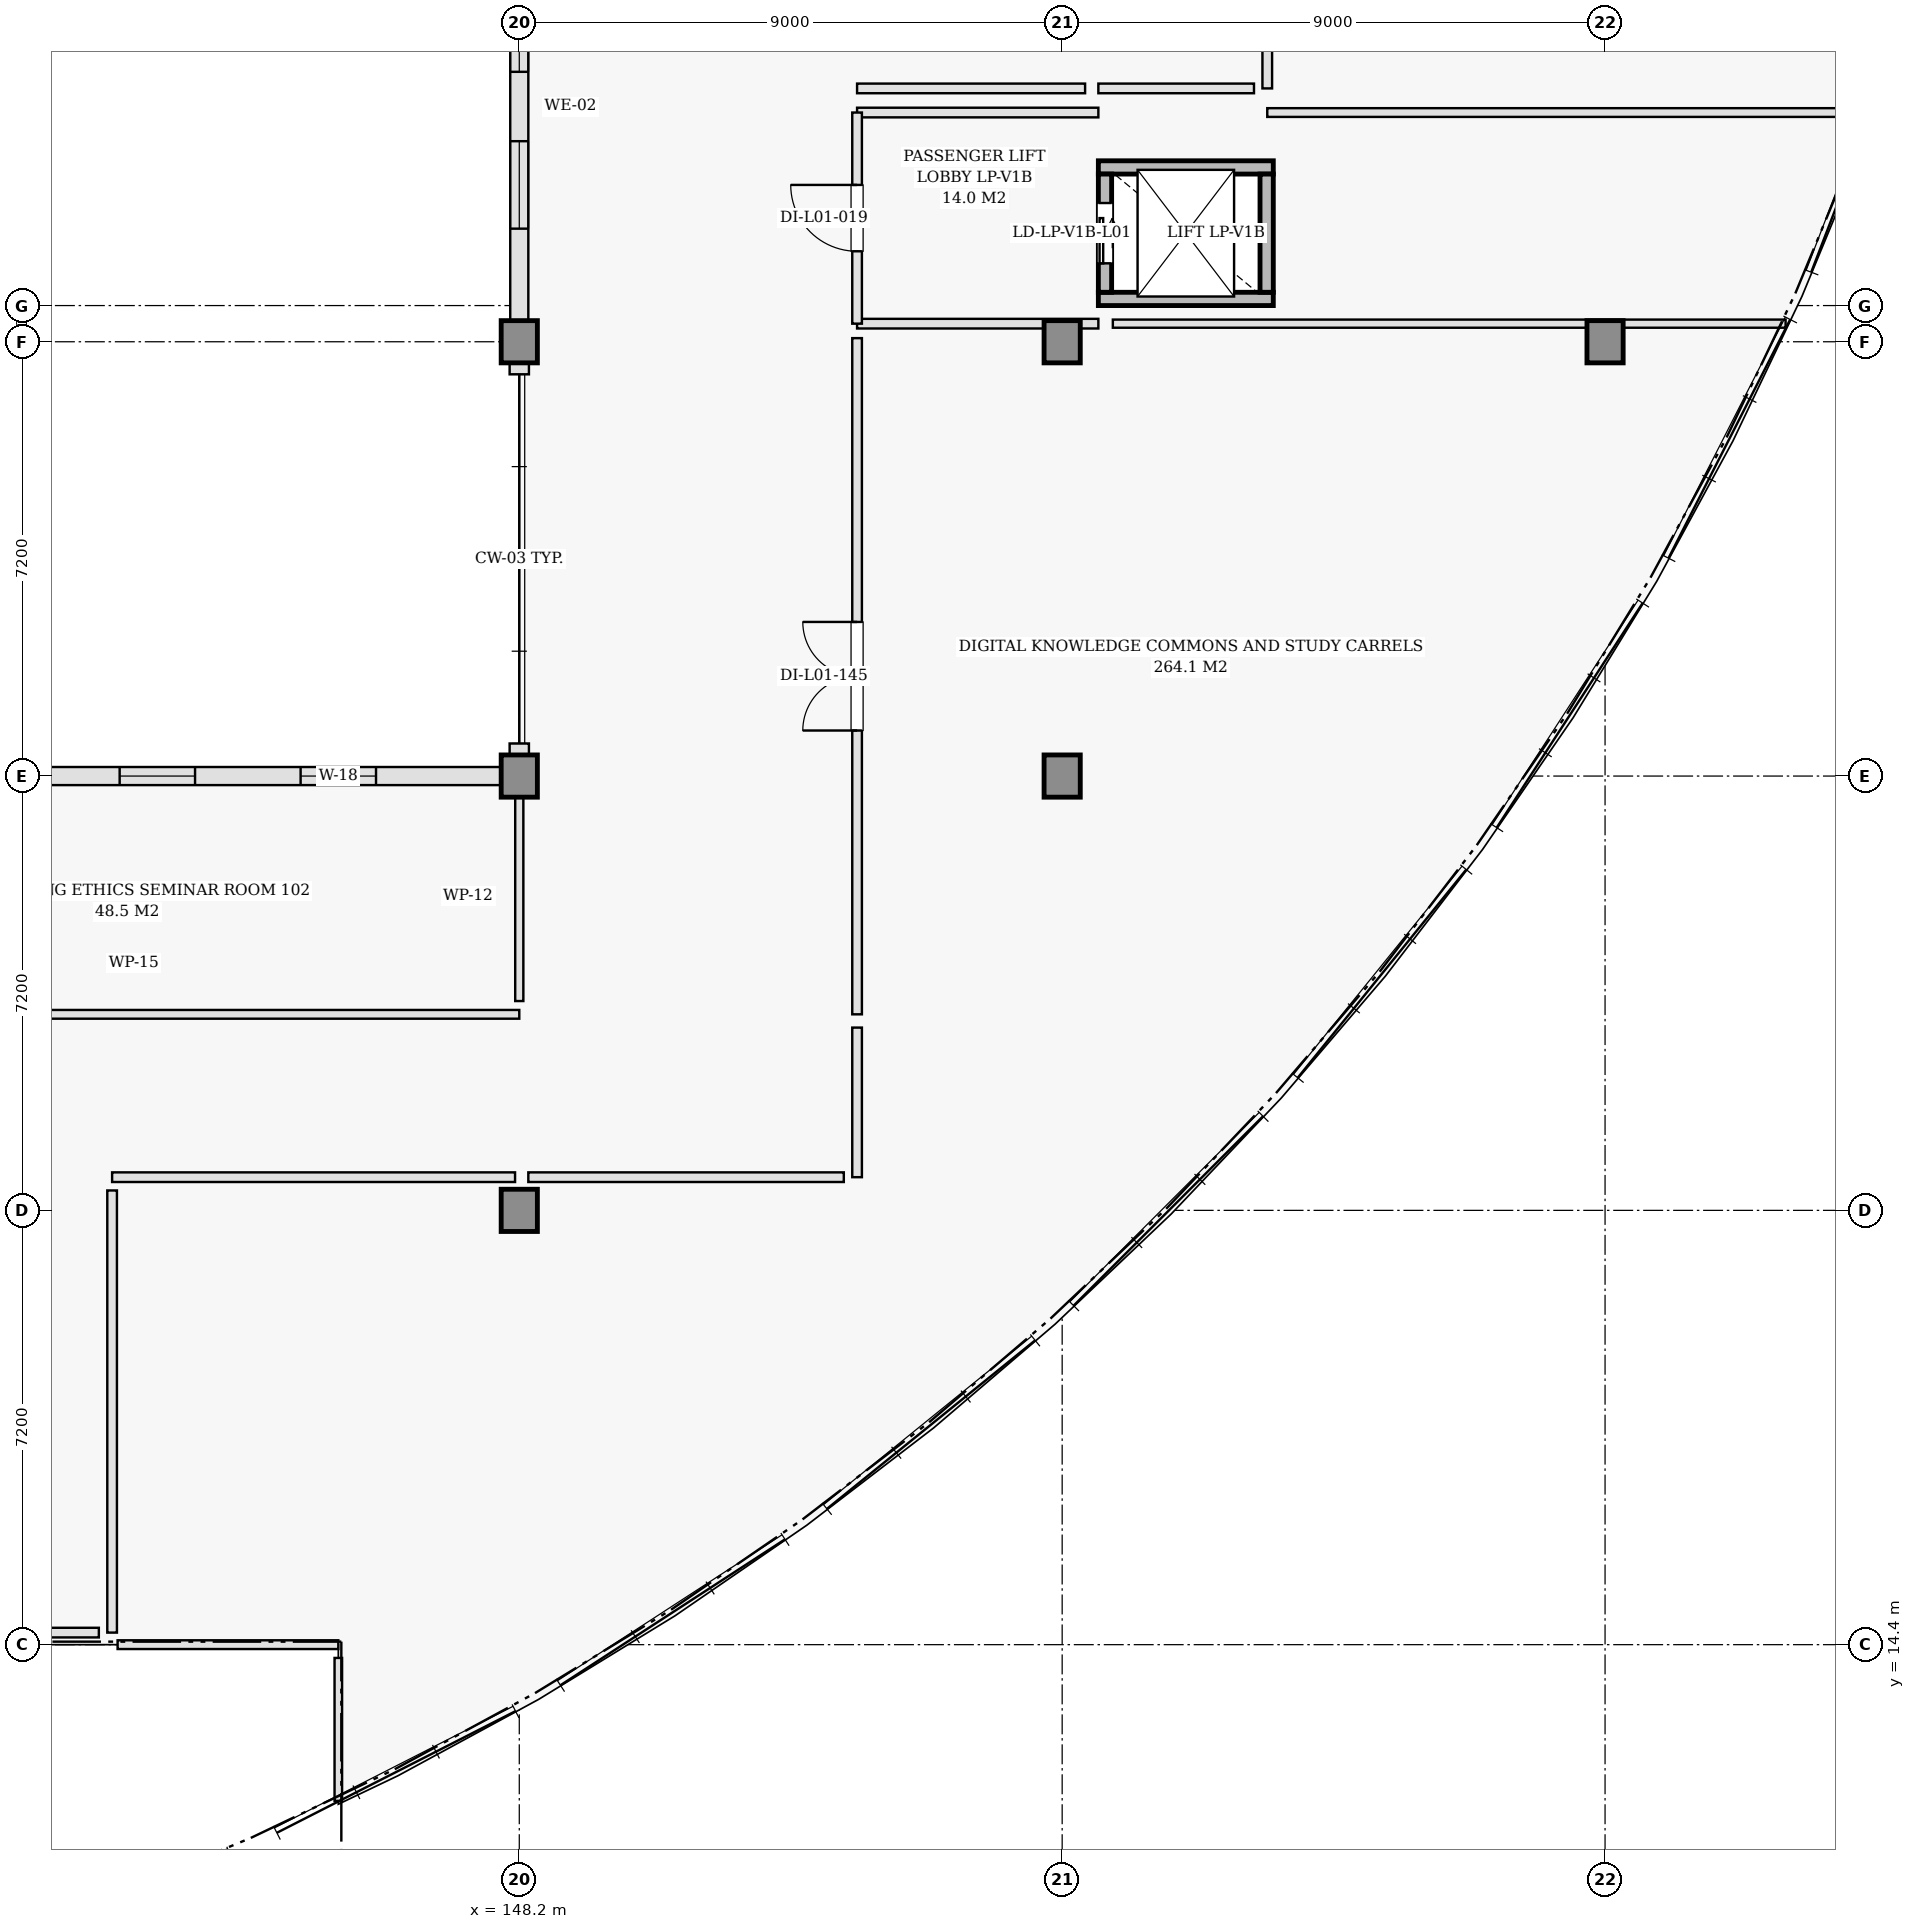
"""IFC4 building model, lengths in metres.
Left out: names, types, materials, properties, quantities, classifications, styles, units other than length and angle.
Written with IfcOpenShell. Run it as: python <this file> out.ifc"""

import sys

from ifc_helpers import new_model, si_unit, direction, frame, frame_2d, origin, origin_2d, place, context, subcontext, project, spatial, rectangle, extrude, element, fill, save


model = new_model("IFC4")
c1 = context("Model", 3, precision=1e-05, world=origin(), true_north=direction((0.0, 1.0)))
c2 = subcontext(c1, "Body", "Model", "MODEL_VIEW")
j1 = project(units=[si_unit("LENGTHUNIT", "METRE"), si_unit("PLANEANGLEUNIT", "RADIAN")], contexts=[c1])
p1 = place(None, origin())
s1 = spatial("IfcSite", under=j1, at=p1, CompositionType="ELEMENT")
p2 = place(p1, origin())
s2 = spatial("IfcBuilding", under=s1, at=p2, CompositionType="ELEMENT")
p3 = place(p2, frame((0.0, 0.0, 4.8)))
s3 = spatial("IfcBuildingStorey", under=s2, at=p3, CompositionType="ELEMENT", Elevation=4.8)
for number, where, z_axis, x_axis in (
    (1, (148.2, 21.6, 0.0), (0.0, 0.0, 1.0), (1.0, 0.0, 0.0)),
    (2, (148.2, 28.8, 0.0), (0.0, 0.0, 1.0), (1.0, 0.0, 0.0)),
    (3, (148.2, 36.0, 0.0), (0.0, 0.0, 1.0), (1.0, 0.0, 0.0)),
    (4, (157.2, 28.8, 0.0), (0.0, 0.0, 1.0), (1.0, 0.0, 0.0)),
    (5, (157.2, 36.0, 0.0), (0.0, 0.0, 1.0), (1.0, 0.0, 0.0)),
    (6, (166.2, 36.0, 0.0), (0.0, 0.0, 1.0), (1.0, 0.0, 0.0)),
):
    element("IfcColumn", number, at=place(p3, frame(where, z_axis=z_axis, x_axis=x_axis)), inside=s3, PredefinedType="COLUMN", context=c2, shape_type="SweptSolid", body=[
        extrude(rectangle(XDim=0.7, YDim=0.7, at=origin_2d()), origin(), (0.0, 0.0, 1.0), 4.8),
    ])
p4 = place(p3, frame((148.2, 43.8, 0.0), z_axis=(0.0, 0.0, 1.0), x_axis=(0.0, -1.0, 0.0)))
e7 = element("IfcWall", 7, at=p4, inside=s3, PredefinedType="SOLIDWALL", context=c2, shape_type="SweptSolid", body=[
    extrude(rectangle(XDim=7.8, YDim=0.3, at=frame_2d((3.9, 0.0))), origin(), (0.0, 0.0, 1.0), 3.665),
])
p5 = place(p4, frame((1.875, 0.0, 0.9)))
e8 = element("IfcOpeningElement", 8, at=p5, cuts=e7, PredefinedType="OPENING", context=c2, shape_type="SweptSolid", body=[
    extrude(rectangle(XDim=1.45, YDim=1.6, at=frame_2d((0.725, 0.8))), frame((0.0, 0.16, 0.0), z_axis=(0.0, -1.0, 0.0), x_axis=(1.0, 0.0, 0.0)), (0.0, 0.0, 1.0), 0.32),
])
p6 = place(p4, frame((4.475, 0.0, 0.9)))
e9 = element("IfcOpeningElement", 9, at=p6, cuts=e7, PredefinedType="OPENING", context=c2, shape_type="SweptSolid", body=[
    extrude(rectangle(XDim=1.45, YDim=1.6, at=frame_2d((0.725, 0.8))), frame((0.0, 0.16, 0.0), z_axis=(0.0, -1.0, 0.0), x_axis=(1.0, 0.0, 0.0)), (0.0, 0.0, 1.0), 0.32),
])
p7 = place(p3, frame((148.2, 36.0, 0.0), z_axis=(0.0, 0.0, 1.0), x_axis=(0.0, -1.0, 0.0)))
e10 = element("IfcWall", 10, at=p7, inside=s3, PredefinedType="SOLIDWALL", context=c2, shape_type="SweptSolid", body=[
    extrude(rectangle(XDim=0.54, YDim=0.32, at=frame_2d((0.27, 0.0))), origin(), (0.0, 0.0, 1.0), 3.665),
])
p8 = place(p3, frame((148.2, 29.34, 0.0), z_axis=(0.0, 0.0, 1.0), x_axis=(0.0, -1.0, 0.0)))
e11 = element("IfcWall", 11, at=p8, inside=s3, PredefinedType="SOLIDWALL", context=c2, shape_type="SweptSolid", body=[
    extrude(rectangle(XDim=0.388, YDim=0.32, at=frame_2d((0.194, 0.0))), origin(), (0.0, 0.0, 1.0), 3.665),
])
p9 = place(p3, frame((148.2, 28.8, 0.0), z_axis=(0.0, 0.0, 1.0), x_axis=(-1.0, 0.0, 0.0)))
e12 = element("IfcWall", 12, at=p9, inside=s3, PredefinedType="SOLIDWALL", context=c2, shape_type="SweptSolid", body=[
    extrude(rectangle(XDim=9.0, YDim=0.3, at=frame_2d((4.5, 0.0))), origin(), (0.0, 0.0, 1.0), 3.665),
])
p10 = place(p9, frame((2.375, 0.0, 0.9)))
e13 = element("IfcOpeningElement", 13, at=p10, cuts=e12, PredefinedType="OPENING", context=c2, shape_type="SweptSolid", body=[
    extrude(rectangle(XDim=1.25, YDim=1.5, at=frame_2d((0.625, 0.75))), frame((0.0, 0.16, 0.0), z_axis=(0.0, -1.0, 0.0), x_axis=(1.0, 0.0, 0.0)), (0.0, 0.0, 1.0), 0.32),
])
p11 = place(p9, frame((5.375, 0.0, 0.9)))
e14 = element("IfcOpeningElement", 14, at=p11, cuts=e12, PredefinedType="OPENING", context=c2, shape_type="SweptSolid", body=[
    extrude(rectangle(XDim=1.25, YDim=1.5, at=frame_2d((0.625, 0.75))), frame((0.0, 0.16, 0.0), z_axis=(0.0, -1.0, 0.0), x_axis=(1.0, 0.0, 0.0)), (0.0, 0.0, 1.0), 0.32),
])
for number, where, z_axis, x_axis in (
    (15, (157.8, 36.71, 0.0), (0.0, 0.0, 1.0), (1.0, 0.0, 0.0)),
    (16, (157.8, 38.89, 0.0), (0.0, 0.0, 1.0), (1.0, 0.0, 0.0)),
):
    element("IfcWall", number, at=place(p3, frame(where, z_axis=z_axis, x_axis=x_axis)), inside=s3, PredefinedType="SHEAR", context=c2, shape_type="SweptSolid", body=[
        extrude(rectangle(XDim=2.9, YDim=0.22, at=frame_2d((1.45, 0.0))), origin(), (0.0, 0.0, 1.0), 4.48),
    ])
p12 = place(p3, frame((157.91, 36.82, 0.0), z_axis=(0.0, 0.0, 1.0), x_axis=(0.0, 1.0, 0.0)))
e17 = element("IfcWall", 17, at=p12, inside=s3, PredefinedType="SHEAR", context=c2, shape_type="SweptSolid", body=[
    extrude(rectangle(XDim=1.96, YDim=0.22, at=frame_2d((0.98, 0.0))), origin(), (0.0, 0.0, 1.0), 4.48),
])
p13 = place(p12, frame((0.48, 0.0, 0.0)))
e18 = element("IfcOpeningElement", 18, at=p13, cuts=e17, PredefinedType="OPENING", context=c2, shape_type="SweptSolid", body=[
    extrude(rectangle(XDim=1.0, YDim=2.15, at=frame_2d((0.5, 1.075))), frame((0.0, 0.12, 0.0), z_axis=(0.0, -1.0, 0.0), x_axis=(1.0, 0.0, 0.0)), (0.0, 0.0, 1.0), 0.24),
])
p14 = place(p3, frame((160.59, 36.82, 0.0), z_axis=(0.0, 0.0, 1.0), x_axis=(0.0, 1.0, 0.0)))
e19 = element("IfcWall", 19, at=p14, inside=s3, PredefinedType="SHEAR", context=c2, shape_type="SweptSolid", body=[
    extrude(rectangle(XDim=1.96, YDim=0.22, at=frame_2d((0.98, 0.0))), origin(), (0.0, 0.0, 1.0), 4.48),
])
p15 = place(p3, frame((153.8, 36.3, 0.0), z_axis=(0.0, 0.0, 1.0), x_axis=(1.0, 0.0, 0.0)))
e20 = element("IfcWall", 20, at=p15, inside=s3, PredefinedType="PARTITIONING", context=c2, shape_type="SweptSolid", body=[
    extrude(rectangle(XDim=4.0, YDim=0.16, at=frame_2d((2.0, 0.0))), origin(), (0.0, 0.0, 1.0), 2.965),
])
p16 = place(p3, frame((153.8, 39.8, 0.0), z_axis=(0.0, 0.0, 1.0), x_axis=(1.0, 0.0, 0.0)))
e21 = element("IfcWall", 21, at=p16, inside=s3, PredefinedType="PARTITIONING", context=c2, shape_type="SweptSolid", body=[
    extrude(rectangle(XDim=4.0, YDim=0.16, at=frame_2d((2.0, 0.0))), origin(), (0.0, 0.0, 1.0), 3.815),
])
p17 = place(p3, frame((153.8, 36.3, 0.0), z_axis=(0.0, 0.0, 1.0), x_axis=(0.0, 1.0, 0.0)))
e22 = element("IfcWall", 22, at=p17, inside=s3, PredefinedType="PARTITIONING", context=c2, shape_type="SweptSolid", body=[
    extrude(rectangle(XDim=3.5, YDim=0.16, at=frame_2d((1.75, 0.0))), origin(), (0.0, 0.0, 1.0), 4.025),
])
p18 = place(p17, frame((1.2, 0.0, 0.0)))
e23 = element("IfcOpeningElement", 23, at=p18, cuts=e22, PredefinedType="OPENING", context=c2, shape_type="SweptSolid", body=[
    extrude(rectangle(XDim=1.1, YDim=2.15, at=frame_2d((0.55, 1.075))), frame((0.0, 0.09, 0.0), z_axis=(0.0, -1.0, 0.0), x_axis=(1.0, 0.0, 0.0)), (0.0, 0.0, 1.0), 0.18),
])
p19 = place(p3, frame((135.42, 24.85, 0.0), z_axis=(0.0, 0.0, 1.0), x_axis=(1.0, 0.0, 0.0)))
e24 = element("IfcWall", 24, at=p19, inside=s3, PredefinedType="PARTITIONING", context=c2, shape_type="SweptSolid", body=[
    extrude(rectangle(XDim=12.78, YDim=0.145, at=frame_2d((6.39, 0.0))), origin(), (0.0, 0.0, 1.0), 3.815),
])
p20 = place(p3, frame((148.2, 25.07, 0.0), z_axis=(0.0, 0.0, 1.0), x_axis=(0.0, 1.0, 0.0)))
e25 = element("IfcWall", 25, at=p20, inside=s3, PredefinedType="PARTITIONING", context=c2, shape_type="SweptSolid", body=[
    extrude(rectangle(XDim=3.49, YDim=0.135, at=frame_2d((1.745, 0.0))), origin(), (0.0, 0.0, 1.0), 3.815),
])
p21 = place(p3, frame((160.6, 40.2, 0.0), z_axis=(0.0, 0.0, 1.0), x_axis=(0.0, 1.0, 0.0)))
e26 = element("IfcWall", 26, at=p21, inside=s3, PredefinedType="PARTITIONING", context=c2, shape_type="SweptSolid", body=[
    extrude(rectangle(XDim=2.8, YDim=0.16, at=frame_2d((1.4, 0.0))), origin(), (0.0, 0.0, 1.0), 4.025),
])
p22 = place(p21, frame((0.85, 0.0, 0.0)))
e27 = element("IfcOpeningElement", 27, at=p22, cuts=e26, PredefinedType="OPENING", context=c2, shape_type="SweptSolid", body=[
    extrude(rectangle(XDim=1.1, YDim=2.15, at=frame_2d((0.55, 1.075))), frame((0.0, 0.09, 0.0), z_axis=(0.0, -1.0, 0.0), x_axis=(1.0, 0.0, 0.0)), (0.0, 0.0, 1.0), 0.18),
])
p23 = place(p3, frame((160.6, 39.8, 0.0), z_axis=(0.0, 0.0, 1.0), x_axis=(1.0, 0.0, 0.0)))
e28 = element("IfcWall", 28, at=p23, inside=s3, PredefinedType="PARTITIONING", context=c2, shape_type="SweptSolid", body=[
    extrude(rectangle(XDim=10.035, YDim=0.145, at=frame_2d((5.018, 0.0))), origin(), (0.0, 0.0, 1.0), 2.965),
])
p24 = place(p3, frame((153.8, 24.85, 0.0), z_axis=(0.0, 0.0, 1.0), x_axis=(0.0, 1.0, 0.0)))
e29 = element("IfcWall", 29, at=p24, inside=s3, PredefinedType="PARTITIONING", context=c2, shape_type="SweptSolid", body=[
    extrude(rectangle(XDim=11.21, YDim=0.16, at=frame_2d((5.605, 0.0))), origin(), (0.0, 0.0, 1.0), 3.665),
])
p25 = place(p24, frame((4.705, 0.0, 0.0)))
e30 = element("IfcOpeningElement", 30, at=p25, cuts=e29, PredefinedType="OPENING", context=c2, shape_type="SweptSolid", body=[
    extrude(rectangle(XDim=1.8, YDim=2.2, at=frame_2d((0.9, 1.1))), frame((0.0, 0.09, 0.0), z_axis=(0.0, -1.0, 0.0), x_axis=(1.0, 0.0, 0.0)), (0.0, 0.0, 1.0), 0.18),
])
p26 = place(p3, frame((153.8, 22.15, 0.0), z_axis=(0.0, 0.0, 1.0), x_axis=(0.0, 1.0, 0.0)))
e31 = element("IfcWall", 31, at=p26, inside=s3, PredefinedType="PARTITIONING", context=c2, shape_type="SweptSolid", body=[
    extrude(rectangle(XDim=2.48, YDim=0.16, at=frame_2d((1.24, 0.0))), origin(), (0.0, 0.0, 1.0), 4.48),
])
p27 = place(p3, frame((148.35, 22.15, 0.0), z_axis=(0.0, 0.0, 1.0), x_axis=(1.0, 0.0, 0.0)))
e32 = element("IfcWall", 32, at=p27, inside=s3, PredefinedType="PARTITIONING", context=c2, shape_type="SweptSolid", body=[
    extrude(rectangle(XDim=5.23, YDim=0.16, at=frame_2d((2.615, 0.0))), origin(), (0.0, 0.0, 1.0), 3.815),
])
p28 = place(p3, frame((141.45, 22.15, 0.0), z_axis=(0.0, 0.0, 1.0), x_axis=(1.0, 0.0, 0.0)))
e33 = element("IfcWall", 33, at=p28, inside=s3, PredefinedType="PARTITIONING", context=c2, shape_type="SweptSolid", body=[
    extrude(rectangle(XDim=6.68, YDim=0.16, at=frame_2d((3.34, 0.0))), origin(), (0.0, 0.0, 1.0), 3.815),
])
p29 = place(p3, frame((141.45, 14.6, 0.0), z_axis=(0.0, 0.0, 1.0), x_axis=(0.0, 1.0, 0.0)))
e34 = element("IfcWall", 34, at=p29, inside=s3, PredefinedType="PARTITIONING", context=c2, shape_type="SweptSolid", body=[
    extrude(rectangle(XDim=7.33, YDim=0.16, at=frame_2d((3.665, 0.0))), origin(), (0.0, 0.0, 1.0), 3.665),
])
p30 = place(p3, frame((141.541, 14.4, 0.0), z_axis=(0.0, 0.0, 1.0), x_axis=(1.0, 0.0, 0.0)))
e35 = element("IfcWall", 35, at=p30, inside=s3, PredefinedType="PARTITIONING", context=c2, shape_type="SweptSolid", body=[
    extrude(rectangle(XDim=3.659, YDim=0.145, at=frame_2d((1.83, 0.0))), origin(), (0.0, 0.0, 1.0), 4.48),
])
p31 = place(p3, frame((158.04, 36.3, 0.0), z_axis=(0.0, 0.0, 1.0), x_axis=(1.0, 0.0, 0.0)))
e36 = element("IfcWall", 36, at=p31, inside=s3, PredefinedType="PARTITIONING", context=c2, shape_type="SweptSolid", body=[
    extrude(rectangle(XDim=11.153, YDim=0.135, at=frame_2d((5.577, 0.0))), origin(), (0.0, 0.0, 1.0), 2.965),
])
p32 = place(p3, frame((145.2, 11.81, 0.0), z_axis=(0.0, 0.0, 1.0), x_axis=(0.0, 1.0, 0.0)))
e37 = element("IfcWall", 37, at=p32, inside=s3, PredefinedType="PARTITIONING", context=c2, shape_type="SweptSolid", body=[
    extrude(rectangle(XDim=2.37, YDim=0.125, at=frame_2d((1.185, 0.0))), origin(), (0.0, 0.0, 1.0), 4.48),
])
p33 = place(p3, frame((157.8, 40.2, 0.0), z_axis=(0.0, 0.0, 1.0), x_axis=(1.0, 0.0, 0.0)))
e38 = element("IfcWall", 38, at=p33, inside=s3, PredefinedType="PARTITIONING", context=c2, shape_type="SweptSolid", body=[
    extrude(rectangle(XDim=2.58, YDim=0.16, at=frame_2d((1.29, 0.0))), origin(), (0.0, 0.0, 1.0), 4.48),
])
p34 = place(p3, frame((153.8, 40.2, 0.0), z_axis=(0.0, 0.0, 1.0), x_axis=(1.0, 0.0, 0.0)))
e39 = element("IfcWall", 39, at=p34, inside=s3, PredefinedType="PARTITIONING", context=c2, shape_type="SweptSolid", body=[
    extrude(rectangle(XDim=3.78, YDim=0.16, at=frame_2d((1.89, 0.0))), origin(), (0.0, 0.0, 1.0), 3.815),
])
p35 = place(p3, frame((138.87, 14.6, 0.0), z_axis=(0.0, 0.0, 1.0), x_axis=(1.0, 0.0, 0.0)))
e40 = element("IfcWall", 40, at=p35, inside=s3, PredefinedType="PARTITIONING", context=c2, shape_type="SweptSolid", body=[
    extrude(rectangle(XDim=2.36, YDim=0.16, at=frame_2d((1.18, 0.0))), origin(), (0.0, 0.0, 1.0), 3.665),
])
p36 = place(p5, origin())
e41 = element("IfcWindow", 41, at=p36, inside=s3, PartitioningType="DOUBLE_PANEL_VERTICAL", PredefinedType="WINDOW", context=c2, shape_type="SweptSolid", body=[
    extrude(rectangle(XDim=1.45, YDim=1.6, at=frame_2d((0.725, 0.8))), frame((0.0, 0.03, 0.0), z_axis=(0.0, -1.0, 0.0), x_axis=(1.0, 0.0, 0.0)), (0.0, 0.0, 1.0), 0.06),
])
fill(e8, e41)
p37 = place(p6, origin())
e42 = element("IfcWindow", 42, at=p37, inside=s3, PartitioningType="DOUBLE_PANEL_VERTICAL", PredefinedType="WINDOW", context=c2, shape_type="SweptSolid", body=[
    extrude(rectangle(XDim=1.45, YDim=1.6, at=frame_2d((0.725, 0.8))), frame((0.0, 0.03, 0.0), z_axis=(0.0, -1.0, 0.0), x_axis=(1.0, 0.0, 0.0)), (0.0, 0.0, 1.0), 0.06),
])
fill(e9, e42)
p38 = place(p10, origin())
e43 = element("IfcWindow", 43, at=p38, inside=s3, PartitioningType="DOUBLE_PANEL_VERTICAL", PredefinedType="WINDOW", context=c2, shape_type="SweptSolid", body=[
    extrude(rectangle(XDim=1.25, YDim=1.5, at=frame_2d((0.625, 0.75))), frame((0.0, 0.03, 0.0), z_axis=(0.0, -1.0, 0.0), x_axis=(1.0, 0.0, 0.0)), (0.0, 0.0, 1.0), 0.06),
])
fill(e13, e43)
p39 = place(p11, origin())
e44 = element("IfcWindow", 44, at=p39, inside=s3, PartitioningType="DOUBLE_PANEL_VERTICAL", PredefinedType="WINDOW", context=c2, shape_type="SweptSolid", body=[
    extrude(rectangle(XDim=1.25, YDim=1.5, at=frame_2d((0.625, 0.75))), frame((0.0, 0.03, 0.0), z_axis=(0.0, -1.0, 0.0), x_axis=(1.0, 0.0, 0.0)), (0.0, 0.0, 1.0), 0.06),
])
fill(e14, e44)
p40 = place(p13, origin())
e45 = element("IfcDoor", 45, at=p40, inside=s3, OperationType="SLIDING_TO_LEFT", PredefinedType="DOOR", context=c2, shape_type="SweptSolid", body=[
    extrude(rectangle(XDim=1.0, YDim=2.15, at=frame_2d((0.5, 1.075))), frame((0.0, 0.025, 0.0), z_axis=(0.0, -1.0, 0.0), x_axis=(1.0, 0.0, 0.0)), (0.0, 0.0, 1.0), 0.05),
])
fill(e18, e45)
p41 = place(p18, origin())
e46 = element("IfcDoor", 46, at=p41, inside=s3, OperationType="SINGLE_SWING_RIGHT", PredefinedType="DOOR", context=c2, shape_type="SweptSolid", body=[
    extrude(rectangle(XDim=1.1, YDim=2.15, at=frame_2d((0.55, 1.075))), frame((0.0, 0.025, 0.0), z_axis=(0.0, -1.0, 0.0), x_axis=(1.0, 0.0, 0.0)), (0.0, 0.0, 1.0), 0.05),
])
fill(e23, e46)
p42 = place(p25, origin())
e47 = element("IfcDoor", 47, at=p42, inside=s3, OperationType="DOUBLE_DOOR_SINGLE_SWING", PredefinedType="DOOR", context=c2, shape_type="SweptSolid", body=[
    extrude(rectangle(XDim=1.8, YDim=2.2, at=frame_2d((0.9, 1.1))), frame((0.0, 0.025, 0.0), z_axis=(0.0, -1.0, 0.0), x_axis=(1.0, 0.0, 0.0)), (0.0, 0.0, 1.0), 0.05),
])
fill(e30, e47)
save(model, sys.argv[1])
